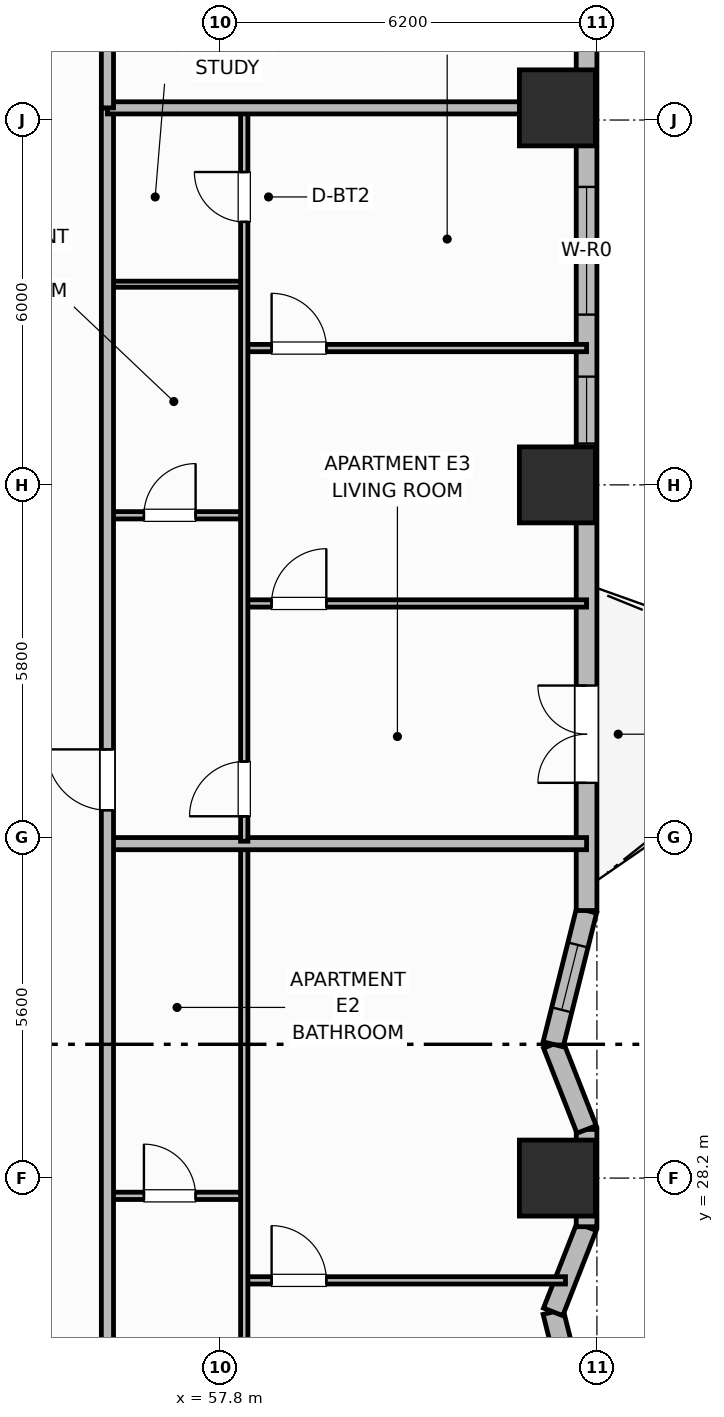
"""IFC4 building model, lengths in metres.
Left out: names, types, materials, properties, quantities, classifications, styles, units other than length and angle.
Written with IfcOpenShell. Run it as: python <this file> out.ifc"""

import sys

from ifc_helpers import new_model, si_unit, direction, frame, frame_2d, origin, origin_2d, place, context, subcontext, project, spatial, rectangle, extrude, element, fill, save


model = new_model("IFC4")
c1 = context("Model", 3, precision=1e-05, world=origin(), true_north=direction((0.0, 1.0)))
c2 = subcontext(c1, "Body", "Model", "MODEL_VIEW")
j1 = project(units=[si_unit("LENGTHUNIT", "METRE"), si_unit("PLANEANGLEUNIT", "RADIAN")], contexts=[c1])
p1 = place(None, origin())
s1 = spatial("IfcSite", under=j1, at=p1, CompositionType="ELEMENT")
p2 = place(p1, origin())
s2 = spatial("IfcBuilding", under=s1, at=p2, CompositionType="ELEMENT")
p3 = place(p2, frame((0.0, 0.0, 32.5)))
s3 = spatial("IfcBuildingStorey", under=s2, at=p3, CompositionType="ELEMENT", Elevation=32.5)
for number, where, z_axis, x_axis in (
    (1, (63.35, 28.2, 0.0), (0.0, 0.0, 1.0), (1.0, 0.0, 0.0)),
    (2, (63.35, 39.6, 0.0), (0.0, 0.0, 1.0), (1.0, 0.0, 0.0)),
    (3, (63.35, 45.8, 0.0), (0.0, 0.0, 1.0), (1.0, 0.0, 0.0)),
):
    element("IfcColumn", number, at=place(p3, frame(where, z_axis=z_axis, x_axis=x_axis)), inside=s3, PredefinedType="COLUMN", context=c2, shape_type="SweptSolid", body=[
        extrude(rectangle(XDim=1.25, YDim=1.25, at=origin_2d()), origin(), (0.0, 0.0, 1.0), 3.7),
    ])
p4 = place(p3, frame((63.83, 23.8, 0.0), z_axis=(0.0, 0.0, 1.0), x_axis=(-0.242560957029, 0.970136166796, 0.0)))
e4 = element("IfcWall", 4, at=p4, inside=s3, PredefinedType="SOLIDWALL", context=c2, shape_type="SweptSolid", body=[
    extrude(rectangle(XDim=2.268, YDim=0.34, at=frame_2d((1.134, 0.0))), origin(), (0.0, 0.0, 1.0), 2.7),
])
p5 = place(p4, frame((0.584, 0.0, 0.89)))
e5 = element("IfcOpeningElement", 5, at=p5, cuts=e4, PredefinedType="OPENING", context=c2, shape_type="SweptSolid", body=[
    extrude(rectangle(XDim=1.1, YDim=1.65, at=frame_2d((0.55, 0.825))), frame((0.0, 0.18, 0.0), z_axis=(0.0, -1.0, 0.0), x_axis=(1.0, 0.0, 0.0)), (0.0, 0.0, 1.0), 0.36),
])
p6 = place(p3, frame((63.28, 26.0, 0.0), z_axis=(0.0, 0.0, 1.0), x_axis=(0.365702591843, 0.930731762818, 0.0)))
e6 = element("IfcWall", 6, at=p6, inside=s3, PredefinedType="SOLIDWALL", context=c2, shape_type="SweptSolid", body=[
    extrude(rectangle(XDim=1.504, YDim=0.34, at=frame_2d((0.752, 0.0))), origin(), (0.0, 0.0, 1.0), 2.7),
])
p7 = place(p3, frame((63.83, 27.4, 0.0), z_axis=(0.0, 0.0, 1.0), x_axis=(0.0, 1.0, 0.0)))
e7 = element("IfcWall", 7, at=p7, inside=s3, PredefinedType="SOLIDWALL", context=c2, shape_type="SweptSolid", body=[
    extrude(rectangle(XDim=1.6, YDim=0.34, at=frame_2d((0.8, 0.0))), origin(), (0.0, 0.0, 1.0), 2.7),
])
p8 = place(p3, frame((63.83, 29.0, 0.0), z_axis=(0.0, 0.0, 1.0), x_axis=(-0.365702591843, 0.930731762818, 0.0)))
e8 = element("IfcWall", 8, at=p8, inside=s3, PredefinedType="SOLIDWALL", context=c2, shape_type="SweptSolid", body=[
    extrude(rectangle(XDim=1.504, YDim=0.34, at=frame_2d((0.752, 0.0))), origin(), (0.0, 0.0, 1.0), 2.7),
])
p9 = place(p3, frame((63.28, 30.4, 0.0), z_axis=(0.0, 0.0, 1.0), x_axis=(0.242535625036, 0.970142500145, 0.0)))
e9 = element("IfcWall", 9, at=p9, inside=s3, PredefinedType="SOLIDWALL", context=c2, shape_type="SweptSolid", body=[
    extrude(rectangle(XDim=2.268, YDim=0.34, at=frame_2d((1.134, 0.0))), origin(), (0.0, 0.0, 1.0), 2.7),
])
p10 = place(p9, frame((0.584, 0.0, 0.89)))
e10 = element("IfcOpeningElement", 10, at=p10, cuts=e9, PredefinedType="OPENING", context=c2, shape_type="SweptSolid", body=[
    extrude(rectangle(XDim=1.1, YDim=1.65, at=frame_2d((0.55, 0.825))), frame((0.0, 0.18, 0.0), z_axis=(0.0, -1.0, 0.0), x_axis=(1.0, 0.0, 0.0)), (0.0, 0.0, 1.0), 0.36),
])
p11 = place(p3, frame((63.83, 32.6, 0.0), z_axis=(0.0, 0.0, 1.0), x_axis=(0.0, 1.0, 0.0)))
e11 = element("IfcWall", 11, at=p11, inside=s3, PredefinedType="SOLIDWALL", context=c2, shape_type="SweptSolid", body=[
    extrude(rectangle(XDim=14.8, YDim=0.34, at=frame_2d((7.4, 0.0))), origin(), (0.0, 0.0, 1.0), 2.7),
])
p12 = place(p11, frame((2.1, 0.0, 0.0)))
e12 = element("IfcOpeningElement", 12, at=p12, cuts=e11, PredefinedType="OPENING", context=c2, shape_type="SweptSolid", body=[
    extrude(rectangle(XDim=1.6, YDim=2.1, at=frame_2d((0.8, 1.05))), frame((0.0, 0.18, 0.0), z_axis=(0.0, -1.0, 0.0), x_axis=(1.0, 0.0, 0.0)), (0.0, 0.0, 1.0), 0.36),
])
p13 = place(p11, frame((7.68, 0.0, 0.89)))
e13 = element("IfcOpeningElement", 13, at=p13, cuts=e11, PredefinedType="OPENING", context=c2, shape_type="SweptSolid", body=[
    extrude(rectangle(XDim=1.1, YDim=1.65, at=frame_2d((0.55, 0.825))), frame((0.0, 0.18, 0.0), z_axis=(0.0, -1.0, 0.0), x_axis=(1.0, 0.0, 0.0)), (0.0, 0.0, 1.0), 0.36),
])
p14 = place(p11, frame((9.8, 0.0, 0.68)))
e14 = element("IfcOpeningElement", 14, at=p14, cuts=e11, PredefinedType="OPENING", context=c2, shape_type="SweptSolid", body=[
    extrude(rectangle(XDim=2.1, YDim=1.9, at=frame_2d((1.05, 0.95))), frame((0.0, 0.18, 0.0), z_axis=(0.0, -1.0, 0.0), x_axis=(1.0, 0.0, 0.0)), (0.0, 0.0, 1.0), 0.36),
])
p15 = place(p3, frame((55.95, 27.908, 0.0), z_axis=(0.0, 0.0, 1.0), x_axis=(1.0, 0.0, 0.0)))
e15 = element("IfcWall", 15, at=p15, inside=s3, PredefinedType="PARTITIONING", context=c2, shape_type="SweptSolid", body=[
    extrude(rectangle(XDim=2.25, YDim=0.12, at=frame_2d((1.125, 0.0))), origin(), (0.0, 0.0, 1.0), 2.53),
])
p16 = place(p15, frame((0.6, 0.0, 0.0)))
e16 = element("IfcOpeningElement", 16, at=p16, cuts=e15, PredefinedType="OPENING", context=c2, shape_type="SweptSolid", body=[
    extrude(rectangle(XDim=0.85, YDim=2.1, at=frame_2d((0.425, 1.05))), frame((0.0, 0.07, 0.0), z_axis=(0.0, -1.0, 0.0), x_axis=(1.0, 0.0, 0.0)), (0.0, 0.0, 1.0), 0.14),
])
p17 = place(p3, frame((58.2, 26.518, 0.0), z_axis=(0.0, 0.0, 1.0), x_axis=(1.0, 0.0, 0.0)))
e17 = element("IfcWall", 17, at=p17, inside=s3, PredefinedType="PARTITIONING", context=c2, shape_type="SweptSolid", body=[
    extrude(rectangle(XDim=5.283, YDim=0.12, at=frame_2d((2.642, 0.0))), origin(), (0.0, 0.0, 1.0), 2.53),
])
p18 = place(p17, frame((0.45, 0.0, 0.0)))
e18 = element("IfcOpeningElement", 18, at=p18, cuts=e17, PredefinedType="OPENING", context=c2, shape_type="SweptSolid", body=[
    extrude(rectangle(XDim=0.9, YDim=2.1, at=frame_2d((0.45, 1.05))), frame((0.0, 0.07, 0.0), z_axis=(0.0, -1.0, 0.0), x_axis=(1.0, 0.0, 0.0)), (0.0, 0.0, 1.0), 0.14),
])
p19 = place(p3, frame((58.2, 22.608, 0.0), z_axis=(0.0, 0.0, 1.0), x_axis=(0.0, 1.0, 0.0)))
e19 = element("IfcWall", 19, at=p19, inside=s3, PredefinedType="PARTITIONING", context=c2, shape_type="SweptSolid", body=[
    extrude(rectangle(XDim=11.052, YDim=0.12, at=frame_2d((5.526, 0.0))), origin(), (0.0, 0.0, 1.0), 2.53),
])
p20 = place(p19, frame((0.41, 0.0, 0.0)))
e20 = element("IfcOpeningElement", 20, at=p20, cuts=e19, PredefinedType="OPENING", context=c2, shape_type="SweptSolid", body=[
    extrude(rectangle(XDim=0.9, YDim=2.1, at=frame_2d((0.45, 1.05))), frame((0.0, 0.07, 0.0), z_axis=(0.0, -1.0, 0.0), x_axis=(1.0, 0.0, 0.0)), (0.0, 0.0, 1.0), 0.14),
])
p21 = place(p3, frame((55.95, 33.7, 0.0), z_axis=(0.0, 0.0, 1.0), x_axis=(1.0, 0.0, 0.0)))
e21 = element("IfcWall", 21, at=p21, inside=s3, PredefinedType="PARTITIONING", context=c2, shape_type="SweptSolid", body=[
    extrude(rectangle(XDim=7.88, YDim=0.2, at=frame_2d((3.94, 0.0))), origin(), (0.0, 0.0, 1.0), 2.53),
])
p22 = place(p3, frame((55.95, 39.1, 0.0), z_axis=(0.0, 0.0, 1.0), x_axis=(1.0, 0.0, 0.0)))
e22 = element("IfcWall", 22, at=p22, inside=s3, PredefinedType="PARTITIONING", context=c2, shape_type="SweptSolid", body=[
    extrude(rectangle(XDim=2.25, YDim=0.12, at=frame_2d((1.125, 0.0))), origin(), (0.0, 0.0, 1.0), 2.53),
])
p23 = place(p22, frame((0.6, 0.0, 0.0)))
e23 = element("IfcOpeningElement", 23, at=p23, cuts=e22, PredefinedType="OPENING", context=c2, shape_type="SweptSolid", body=[
    extrude(rectangle(XDim=0.85, YDim=2.1, at=frame_2d((0.425, 1.05))), frame((0.0, 0.07, 0.0), z_axis=(0.0, -1.0, 0.0), x_axis=(1.0, 0.0, 0.0)), (0.0, 0.0, 1.0), 0.14),
])
p24 = place(p3, frame((55.95, 42.9, 0.0), z_axis=(0.0, 0.0, 1.0), x_axis=(1.0, 0.0, 0.0)))
e24 = element("IfcWall", 24, at=p24, inside=s3, PredefinedType="PARTITIONING", context=c2, shape_type="SweptSolid", body=[
    extrude(rectangle(XDim=2.25, YDim=0.1, at=frame_2d((1.125, 0.0))), origin(), (0.0, 0.0, 1.0), 2.53),
])
p25 = place(p3, frame((58.2, 37.65, 0.0), z_axis=(0.0, 0.0, 1.0), x_axis=(1.0, 0.0, 0.0)))
e25 = element("IfcWall", 25, at=p25, inside=s3, PredefinedType="PARTITIONING", context=c2, shape_type="SweptSolid", body=[
    extrude(rectangle(XDim=5.63, YDim=0.12, at=frame_2d((2.815, 0.0))), origin(), (0.0, 0.0, 1.0), 2.53),
])
p26 = place(p25, frame((0.45, 0.0, 0.0)))
e26 = element("IfcOpeningElement", 26, at=p26, cuts=e25, PredefinedType="OPENING", context=c2, shape_type="SweptSolid", body=[
    extrude(rectangle(XDim=0.9, YDim=2.1, at=frame_2d((0.45, 1.05))), frame((0.0, 0.07, 0.0), z_axis=(0.0, -1.0, 0.0), x_axis=(1.0, 0.0, 0.0)), (0.0, 0.0, 1.0), 0.14),
])
p27 = place(p3, frame((58.2, 41.85, 0.0), z_axis=(0.0, 0.0, 1.0), x_axis=(1.0, 0.0, 0.0)))
e27 = element("IfcWall", 27, at=p27, inside=s3, PredefinedType="PARTITIONING", context=c2, shape_type="SweptSolid", body=[
    extrude(rectangle(XDim=5.63, YDim=0.12, at=frame_2d((2.815, 0.0))), origin(), (0.0, 0.0, 1.0), 2.53),
])
p28 = place(p27, frame((0.45, 0.0, 0.0)))
e28 = element("IfcOpeningElement", 28, at=p28, cuts=e27, PredefinedType="OPENING", context=c2, shape_type="SweptSolid", body=[
    extrude(rectangle(XDim=0.9, YDim=2.1, at=frame_2d((0.45, 1.05))), frame((0.0, 0.07, 0.0), z_axis=(0.0, -1.0, 0.0), x_axis=(1.0, 0.0, 0.0)), (0.0, 0.0, 1.0), 0.14),
])
p29 = place(p3, frame((58.2, 33.74, 0.0), z_axis=(0.0, 0.0, 1.0), x_axis=(0.0, 1.0, 0.0)))
e29 = element("IfcWall", 29, at=p29, inside=s3, PredefinedType="PARTITIONING", context=c2, shape_type="SweptSolid", body=[
    extrude(rectangle(XDim=12.02, YDim=0.12, at=frame_2d((6.01, 0.0))), origin(), (0.0, 0.0, 1.0), 2.53),
])
p30 = place(p29, frame((0.41, 0.0, 0.0)))
e30 = element("IfcOpeningElement", 30, at=p30, cuts=e29, PredefinedType="OPENING", context=c2, shape_type="SweptSolid", body=[
    extrude(rectangle(XDim=0.9, YDim=2.1, at=frame_2d((0.45, 1.05))), frame((0.0, 0.07, 0.0), z_axis=(0.0, -1.0, 0.0), x_axis=(1.0, 0.0, 0.0)), (0.0, 0.0, 1.0), 0.14),
])
p31 = place(p29, frame((10.185, 0.0, 0.0)))
e31 = element("IfcOpeningElement", 31, at=p31, cuts=e29, PredefinedType="OPENING", context=c2, shape_type="SweptSolid", body=[
    extrude(rectangle(XDim=0.82, YDim=2.08, at=frame_2d((0.41, 1.04))), frame((0.0, 0.07, 0.0), z_axis=(0.0, -1.0, 0.0), x_axis=(1.0, 0.0, 0.0)), (0.0, 0.0, 1.0), 0.14),
])
p32 = place(p3, frame((55.95, 10.6, 0.0), z_axis=(0.0, 0.0, 1.0), x_axis=(0.0, 1.0, 0.0)))
e32 = element("IfcWall", 32, at=p32, inside=s3, PredefinedType="PARTITIONING", context=c2, shape_type="SweptSolid", body=[
    extrude(rectangle(XDim=35.2, YDim=0.2, at=frame_2d((17.6, 0.0))), origin(), (0.0, 0.0, 1.0), 2.53),
])
p33 = place(p32, frame((2.65, 0.0, 0.0)))
e33 = element("IfcOpeningElement", 33, at=p33, cuts=e32, PredefinedType="OPENING", context=c2, shape_type="SweptSolid", body=[
    extrude(rectangle(XDim=1.0, YDim=2.15, at=frame_2d((0.5, 1.075))), frame((0.0, 0.11, 0.0), z_axis=(0.0, -1.0, 0.0), x_axis=(1.0, 0.0, 0.0)), (0.0, 0.0, 1.0), 0.22),
])
p34 = place(p32, frame((12.518, 0.0, 0.0)))
e34 = element("IfcOpeningElement", 34, at=p34, cuts=e32, PredefinedType="OPENING", context=c2, shape_type="SweptSolid", body=[
    extrude(rectangle(XDim=1.0, YDim=2.15, at=frame_2d((0.5, 1.075))), frame((0.0, 0.11, 0.0), z_axis=(0.0, -1.0, 0.0), x_axis=(1.0, 0.0, 0.0)), (0.0, 0.0, 1.0), 0.22),
])
p35 = place(p32, frame((23.65, 0.0, 0.0)))
e35 = element("IfcOpeningElement", 35, at=p35, cuts=e32, PredefinedType="OPENING", context=c2, shape_type="SweptSolid", body=[
    extrude(rectangle(XDim=1.0, YDim=2.15, at=frame_2d((0.5, 1.075))), frame((0.0, 0.11, 0.0), z_axis=(0.0, -1.0, 0.0), x_axis=(1.0, 0.0, 0.0)), (0.0, 0.0, 1.0), 0.22),
])
p36 = place(p3, frame((55.95, 45.8, 0.0), z_axis=(0.0, 0.0, 1.0), x_axis=(1.0, 0.0, 0.0)))
e36 = element("IfcWall", 36, at=p36, inside=s3, PredefinedType="PARTITIONING", context=c2, shape_type="SweptSolid", body=[
    extrude(rectangle(XDim=7.46, YDim=0.2, at=frame_2d((3.73, 0.0))), origin(), (0.0, 0.0, 1.0), 2.53),
])
p37 = place(p3, frame((55.95, 45.8, 0.0), z_axis=(0.0, 0.0, 1.0), x_axis=(0.0, 1.0, 0.0)))
e37 = element("IfcWall", 37, at=p37, inside=s3, PredefinedType="PARTITIONING", context=c2, shape_type="SweptSolid", body=[
    extrude(rectangle(XDim=5.63, YDim=0.2, at=frame_2d((2.815, 0.0))), origin(), (0.0, 0.0, 1.0), 2.53),
])
p38 = place(p10, origin())
e38 = element("IfcWindow", 38, at=p38, inside=s3, PartitioningType="SINGLE_PANEL", PredefinedType="WINDOW", context=c2, shape_type="SweptSolid", body=[
    extrude(rectangle(XDim=1.1, YDim=1.65, at=frame_2d((0.55, 0.825))), frame((0.0, 0.03, 0.0), z_axis=(0.0, -1.0, 0.0), x_axis=(1.0, 0.0, 0.0)), (0.0, 0.0, 1.0), 0.06),
])
fill(e10, e38)
p39 = place(p12, origin())
e39 = element("IfcDoor", 39, at=p39, inside=s3, OperationType="DOUBLE_DOOR_SINGLE_SWING", PredefinedType="DOOR", context=c2, shape_type="SweptSolid", body=[
    extrude(rectangle(XDim=1.6, YDim=2.1, at=frame_2d((0.8, 1.05))), frame((0.0, 0.025, 0.0), z_axis=(0.0, -1.0, 0.0), x_axis=(1.0, 0.0, 0.0)), (0.0, 0.0, 1.0), 0.05),
])
fill(e12, e39)
p40 = place(p13, origin())
e40 = element("IfcWindow", 40, at=p40, inside=s3, PartitioningType="SINGLE_PANEL", PredefinedType="WINDOW", context=c2, shape_type="SweptSolid", body=[
    extrude(rectangle(XDim=1.1, YDim=1.65, at=frame_2d((0.55, 0.825))), frame((0.0, 0.03, 0.0), z_axis=(0.0, -1.0, 0.0), x_axis=(1.0, 0.0, 0.0)), (0.0, 0.0, 1.0), 0.06),
])
fill(e13, e40)
p41 = place(p14, origin())
e41 = element("IfcWindow", 41, at=p41, inside=s3, PartitioningType="SINGLE_PANEL", PredefinedType="WINDOW", context=c2, shape_type="SweptSolid", body=[
    extrude(rectangle(XDim=2.1, YDim=1.9, at=frame_2d((1.05, 0.95))), frame((0.0, 0.03, 0.0), z_axis=(0.0, -1.0, 0.0), x_axis=(1.0, 0.0, 0.0)), (0.0, 0.0, 1.0), 0.06),
])
fill(e14, e41)
p42 = place(p16, origin())
e42 = element("IfcDoor", 42, at=p42, inside=s3, OperationType="SINGLE_SWING_LEFT", PredefinedType="DOOR", context=c2, shape_type="SweptSolid", body=[
    extrude(rectangle(XDim=0.85, YDim=2.1, at=frame_2d((0.425, 1.05))), frame((0.0, 0.025, 0.0), z_axis=(0.0, -1.0, 0.0), x_axis=(1.0, 0.0, 0.0)), (0.0, 0.0, 1.0), 0.05),
])
fill(e16, e42)
p43 = place(p18, origin())
e43 = element("IfcDoor", 43, at=p43, inside=s3, OperationType="SINGLE_SWING_LEFT", PredefinedType="DOOR", context=c2, shape_type="SweptSolid", body=[
    extrude(rectangle(XDim=0.9, YDim=2.1, at=frame_2d((0.45, 1.05))), frame((0.0, 0.025, 0.0), z_axis=(0.0, -1.0, 0.0), x_axis=(1.0, 0.0, 0.0)), (0.0, 0.0, 1.0), 0.05),
])
fill(e18, e43)
p44 = place(p23, origin())
e44 = element("IfcDoor", 44, at=p44, inside=s3, OperationType="SINGLE_SWING_RIGHT", PredefinedType="DOOR", context=c2, shape_type="SweptSolid", body=[
    extrude(rectangle(XDim=0.85, YDim=2.1, at=frame_2d((0.425, 1.05))), frame((0.0, 0.025, 0.0), z_axis=(0.0, -1.0, 0.0), x_axis=(1.0, 0.0, 0.0)), (0.0, 0.0, 1.0), 0.05),
])
fill(e23, e44)
p45 = place(p26, origin())
e45 = element("IfcDoor", 45, at=p45, inside=s3, OperationType="SINGLE_SWING_RIGHT", PredefinedType="DOOR", context=c2, shape_type="SweptSolid", body=[
    extrude(rectangle(XDim=0.9, YDim=2.1, at=frame_2d((0.45, 1.05))), frame((0.0, 0.025, 0.0), z_axis=(0.0, -1.0, 0.0), x_axis=(1.0, 0.0, 0.0)), (0.0, 0.0, 1.0), 0.05),
])
fill(e26, e45)
p46 = place(p28, origin())
e46 = element("IfcDoor", 46, at=p46, inside=s3, OperationType="SINGLE_SWING_LEFT", PredefinedType="DOOR", context=c2, shape_type="SweptSolid", body=[
    extrude(rectangle(XDim=0.9, YDim=2.1, at=frame_2d((0.45, 1.05))), frame((0.0, 0.025, 0.0), z_axis=(0.0, -1.0, 0.0), x_axis=(1.0, 0.0, 0.0)), (0.0, 0.0, 1.0), 0.05),
])
fill(e28, e46)
p47 = place(p30, origin())
e47 = element("IfcDoor", 47, at=p47, inside=s3, OperationType="SINGLE_SWING_LEFT", PredefinedType="DOOR", context=c2, shape_type="SweptSolid", body=[
    extrude(rectangle(XDim=0.9, YDim=2.1, at=frame_2d((0.45, 1.05))), frame((0.0, 0.025, 0.0), z_axis=(0.0, -1.0, 0.0), x_axis=(1.0, 0.0, 0.0)), (0.0, 0.0, 1.0), 0.05),
])
fill(e30, e47)
p48 = place(p31, origin())
e48 = element("IfcDoor", 48, at=p48, inside=s3, OperationType="SINGLE_SWING_RIGHT", PredefinedType="DOOR", context=c2, shape_type="SweptSolid", body=[
    extrude(rectangle(XDim=0.82, YDim=2.08, at=frame_2d((0.41, 1.04))), frame((0.0, 0.025, 0.0), z_axis=(0.0, -1.0, 0.0), x_axis=(1.0, 0.0, 0.0)), (0.0, 0.0, 1.0), 0.05),
])
fill(e31, e48)
p49 = place(p35, origin())
e49 = element("IfcDoor", 49, at=p49, inside=s3, OperationType="SINGLE_SWING_RIGHT", PredefinedType="DOOR", context=c2, shape_type="SweptSolid", body=[
    extrude(rectangle(XDim=1.0, YDim=2.15, at=frame_2d((0.5, 1.075))), frame((0.0, 0.025, 0.0), z_axis=(0.0, -1.0, 0.0), x_axis=(1.0, 0.0, 0.0)), (0.0, 0.0, 1.0), 0.05),
])
fill(e35, e49)
save(model, sys.argv[1])
